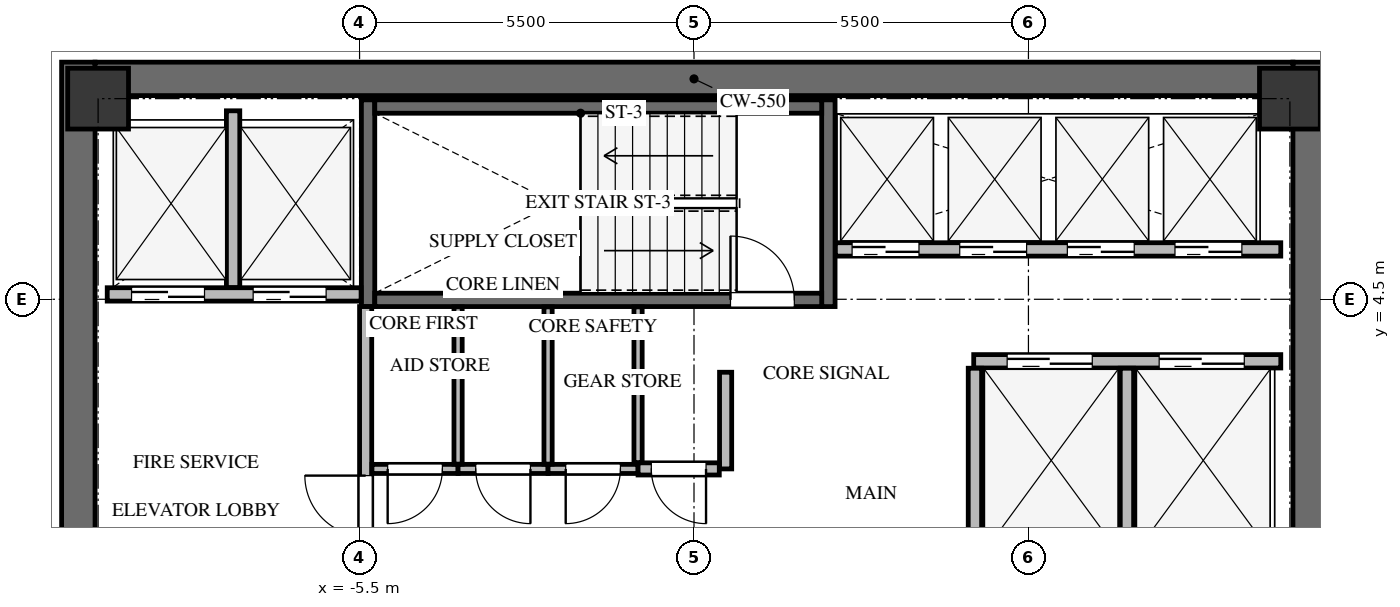
"""IFC4 building model, lengths in metres.
Left out: names, types, materials, properties, quantities, classifications, styles, units other than length and angle.
Written with IfcOpenShell. Run it as: python <this file> out.ifc"""

import sys

from ifc_helpers import new_model, si_unit, direction, frame, frame_2d, origin, origin_2d, place, context, subcontext, project, spatial, rectangle, extrude, source, transform, mapped, element, fill, save


model = new_model("IFC4")
c1 = context("Model", 3, precision=1e-05, world=origin(), true_north=direction((0.0, 1.0)))
c2 = subcontext(c1, "Body", "Model", "MODEL_VIEW")
j1 = project(units=[si_unit("LENGTHUNIT", "METRE"), si_unit("PLANEANGLEUNIT", "RADIAN")], contexts=[c1])
p1 = place(None, origin())
s1 = spatial("IfcSite", under=j1, at=p1, CompositionType="ELEMENT")
p2 = place(p1, origin())
s2 = spatial("IfcBuilding", under=s1, at=p2, CompositionType="ELEMENT")
p3 = place(p2, frame((0.0, 0.0, 221.6)))
s3 = spatial("IfcBuildingStorey", under=s2, at=p3, CompositionType="ELEMENT", Elevation=221.6)
for number, where, z_axis, x_axis in (
    (1, (-10.125, -8.4, 0.0), (0.0, 0.0, 1.0), (0.0, 1.0, 0.0)),
    (2, (10.125, -8.4, 0.0), (0.0, 0.0, 1.0), (0.0, 1.0, 0.0)),
):
    element("IfcWall", number, at=place(p3, frame(where, z_axis=z_axis, x_axis=x_axis)), inside=s3, PredefinedType="SHEAR", context=c2, shape_type="SweptSolid", body=[
        extrude(rectangle(XDim=16.8, YDim=0.55, at=frame_2d((8.4, 0.0))), origin(), (0.0, 0.0, 1.0), 3.3),
    ])
p4 = place(p3, frame((-9.85, 8.125, 0.0), z_axis=(0.0, 0.0, 1.0), x_axis=(1.0, 0.0, 0.0)))
e3 = element("IfcWall", 3, at=p4, inside=s3, PredefinedType="SHEAR", context=c2, shape_type="SweptSolid", body=[
    extrude(rectangle(XDim=19.7, YDim=0.55, at=frame_2d((9.85, 0.0))), origin(), (0.0, 0.0, 1.0), 3.3),
])
for number, where, z_axis, x_axis in (
    (4, (2.21, 4.38, -0.24), (0.0, 0.0, 1.0), (0.0, 1.0, 0.0)),
    (5, (-5.36, 7.78, -0.24), (0.0, 0.0, 1.0), (0.0, -1.0, 0.0)),
):
    element("IfcWall", number, at=place(p3, frame(where, z_axis=z_axis, x_axis=x_axis)), inside=s3, PredefinedType="SHEAR", context=c2, shape_type="SweptSolid", body=[
        extrude(rectangle(XDim=3.4, YDim=0.22, at=frame_2d((1.7, 0.0))), origin(), (0.0, 0.0, 1.0), 3.3),
    ])
p5 = place(p3, frame((-5.25, 4.49, -0.24), z_axis=(0.0, 0.0, 1.0), x_axis=(1.0, 0.0, 0.0)))
e6 = element("IfcWall", 6, at=p5, inside=s3, PredefinedType="SHEAR", context=c2, shape_type="SweptSolid", body=[
    extrude(rectangle(XDim=7.35, YDim=0.22, at=frame_2d((3.675, 0.0))), origin(), (0.0, 0.0, 1.0), 3.3),
])
p6 = place(p5, frame((5.85, 0.0, 0.0)))
e7 = element("IfcOpeningElement", 7, at=p6, cuts=e6, PredefinedType="OPENING", context=c2, shape_type="SweptSolid", body=[
    extrude(rectangle(XDim=1.05, YDim=2.15, at=frame_2d((0.525, 1.075))), frame((0.0, 0.12, 0.0), z_axis=(0.0, -1.0, 0.0), x_axis=(1.0, 0.0, 0.0)), (0.0, 0.0, 1.0), 0.24),
])
p7 = place(p3, frame((2.1, 7.67, -0.24), z_axis=(0.0, 0.0, 1.0), x_axis=(-1.0, 0.0, 0.0)))
e8 = element("IfcWall", 8, at=p7, inside=s3, PredefinedType="SHEAR", context=c2, shape_type="SweptSolid", body=[
    extrude(rectangle(XDim=7.35, YDim=0.22, at=frame_2d((3.675, 0.0))), origin(), (0.0, 0.0, 1.0), 3.3),
])
m1 = source(origin(), c2, "Body", "SweptSolid", [
    extrude(rectangle(XDim=1.0, YDim=1.0, at=origin_2d()), origin(), (0.0, 0.0, 1.0), 3.3),
])
for number, where, z_axis, x_axis in (
    (9, (9.8, 7.8, -0.24), (0.0, 0.0, 1.0), (1.0, 0.0, 0.0)),
    (10, (-9.8, 7.8, -0.24), (0.0, 0.0, 1.0), (1.0, 0.0, 0.0)),
):
    element("IfcColumn", number, at=place(p3, frame(where, z_axis=z_axis, x_axis=x_axis)), inside=s3, PredefinedType="COLUMN", context=c2, shape_type="MappedRepresentation", body=[
        mapped(m1, transform((0.0, 0.0, 0.0), x_axis=(1.0, 0.0, 0.0), y_axis=(0.0, 1.0, 0.0), z_axis=(0.0, 0.0, 1.0), scale=1.0)),
    ])
p8 = place(p3, frame((-9.65, 4.58, 0.0), z_axis=(0.0, 0.0, 1.0), x_axis=(1.0, 0.0, 0.0)))
e11 = element("IfcWall", 11, at=p8, inside=s3, PredefinedType="SOLIDWALL", context=c2, shape_type="SweptSolid", body=[
    extrude(rectangle(XDim=4.175, YDim=0.22, at=frame_2d((2.087, 0.0))), origin(), (0.0, 0.0, 1.0), 3.045),
])
p9 = place(p8, frame((0.4, 0.0, 0.0)))
e12 = element("IfcOpeningElement", 12, at=p9, cuts=e11, PredefinedType="OPENING", context=c2, shape_type="SweptSolid", body=[
    extrude(rectangle(XDim=1.2, YDim=2.15, at=frame_2d((0.6, 1.075))), frame((0.0, 0.12, 0.0), z_axis=(0.0, -1.0, 0.0), x_axis=(1.0, 0.0, 0.0)), (0.0, 0.0, 1.0), 0.24),
])
p10 = place(p8, frame((2.4, 0.0, 0.0)))
e13 = element("IfcOpeningElement", 13, at=p10, cuts=e11, PredefinedType="OPENING", context=c2, shape_type="SweptSolid", body=[
    extrude(rectangle(XDim=1.2, YDim=2.15, at=frame_2d((0.6, 1.075))), frame((0.0, 0.12, 0.0), z_axis=(0.0, -1.0, 0.0), x_axis=(1.0, 0.0, 0.0)), (0.0, 0.0, 1.0), 0.24),
])
p11 = place(p3, frame((-7.58, 4.694, 0.0), z_axis=(0.0, 0.0, 1.0), x_axis=(0.0, 1.0, 0.0)))
e14 = element("IfcWall", 14, at=p11, inside=s3, PredefinedType="SOLIDWALL", context=c2, shape_type="SweptSolid", body=[
    extrude(rectangle(XDim=2.906, YDim=0.22, at=frame_2d((1.453, 0.0))), origin(), (0.0, 0.0, 1.0), 3.045),
])
p12 = place(p3, frame((-5.4, 0.354, 0.0), z_axis=(0.0, 0.0, 1.0), x_axis=(0.0, 1.0, 0.0)))
e15 = element("IfcWall", 15, at=p12, inside=s3, PredefinedType="SOLIDWALL", context=c2, shape_type="SweptSolid", body=[
    extrude(rectangle(XDim=4.026, YDim=0.2, at=frame_2d((2.013, 0.0))), origin(), (0.0, 0.0, 1.0), 3.045),
])
p13 = place(p12, frame((0.246, 0.0, 0.0)))
e16 = element("IfcOpeningElement", 16, at=p13, cuts=e15, PredefinedType="OPENING", context=c2, shape_type="SweptSolid", body=[
    extrude(rectangle(XDim=1.0, YDim=2.15, at=frame_2d((0.5, 1.075))), frame((0.0, 0.11, 0.0), z_axis=(0.0, -1.0, 0.0), x_axis=(1.0, 0.0, 0.0)), (0.0, 0.0, 1.0), 0.22),
])
p14 = place(p3, frame((4.6, 3.48, 0.0), z_axis=(0.0, 0.0, 1.0), x_axis=(1.0, 0.0, 0.0)))
e17 = element("IfcWall", 17, at=p14, inside=s3, PredefinedType="SOLIDWALL", context=c2, shape_type="SweptSolid", body=[
    extrude(rectangle(XDim=5.05, YDim=0.22, at=frame_2d((2.525, 0.0))), origin(), (0.0, 0.0, 1.0), 3.045),
])
p15 = place(p14, frame((0.55, 0.0, 0.0)))
e18 = element("IfcOpeningElement", 18, at=p15, cuts=e17, PredefinedType="OPENING", context=c2, shape_type="SweptSolid", body=[
    extrude(rectangle(XDim=1.4, YDim=2.15, at=frame_2d((0.7, 1.075))), frame((0.0, 0.12, 0.0), z_axis=(0.0, -1.0, 0.0), x_axis=(1.0, 0.0, 0.0)), (0.0, 0.0, 1.0), 0.24),
])
p16 = place(p14, frame((3.05, 0.0, 0.0)))
e19 = element("IfcOpeningElement", 19, at=p16, cuts=e17, PredefinedType="OPENING", context=c2, shape_type="SweptSolid", body=[
    extrude(rectangle(XDim=1.4, YDim=2.15, at=frame_2d((0.7, 1.075))), frame((0.0, 0.12, 0.0), z_axis=(0.0, -1.0, 0.0), x_axis=(1.0, 0.0, 0.0)), (0.0, 0.0, 1.0), 0.24),
])
for number, where, z_axis, x_axis in (
    (20, (4.62, 0.18, 0.0), (0.0, 0.0, 1.0), (0.0, 1.0, 0.0)),
    (21, (7.12, 0.18, 0.0), (0.0, 0.0, 1.0), (0.0, 1.0, 0.0)),
):
    element("IfcWall", number, at=place(p3, frame(where, z_axis=z_axis, x_axis=x_axis)), inside=s3, PredefinedType="SOLIDWALL", context=c2, shape_type="SweptSolid", body=[
        extrude(rectangle(XDim=3.186, YDim=0.22, at=frame_2d((1.593, 0.0))), origin(), (0.0, 0.0, 1.0), 3.045),
    ])
p17 = place(p3, frame((2.325, 5.32, 0.0), z_axis=(0.0, 0.0, 1.0), x_axis=(1.0, 0.0, 0.0)))
e22 = element("IfcWall", 22, at=p17, inside=s3, PredefinedType="SOLIDWALL", context=c2, shape_type="SweptSolid", body=[
    extrude(rectangle(XDim=7.325, YDim=0.22, at=frame_2d((3.663, 0.0))), origin(), (0.0, 0.0, 1.0), 3.045),
])
p18 = place(p17, frame((0.275, 0.0, 0.0)))
e23 = element("IfcOpeningElement", 23, at=p18, cuts=e22, PredefinedType="OPENING", context=c2, shape_type="SweptSolid", body=[
    extrude(rectangle(XDim=1.1, YDim=2.15, at=frame_2d((0.55, 1.075))), frame((0.0, 0.12, 0.0), z_axis=(0.0, -1.0, 0.0), x_axis=(1.0, 0.0, 0.0)), (0.0, 0.0, 1.0), 0.24),
])
p19 = place(p17, frame((2.045, 0.0, 0.0)))
e24 = element("IfcOpeningElement", 24, at=p19, cuts=e22, PredefinedType="OPENING", context=c2, shape_type="SweptSolid", body=[
    extrude(rectangle(XDim=1.1, YDim=2.15, at=frame_2d((0.55, 1.075))), frame((0.0, 0.12, 0.0), z_axis=(0.0, -1.0, 0.0), x_axis=(1.0, 0.0, 0.0)), (0.0, 0.0, 1.0), 0.24),
])
p20 = place(p17, frame((3.815, 0.0, 0.0)))
e25 = element("IfcOpeningElement", 25, at=p20, cuts=e22, PredefinedType="OPENING", context=c2, shape_type="SweptSolid", body=[
    extrude(rectangle(XDim=1.1, YDim=2.15, at=frame_2d((0.55, 1.075))), frame((0.0, 0.12, 0.0), z_axis=(0.0, -1.0, 0.0), x_axis=(1.0, 0.0, 0.0)), (0.0, 0.0, 1.0), 0.24),
])
p21 = place(p17, frame((5.585, 0.0, 0.0)))
e26 = element("IfcOpeningElement", 26, at=p21, cuts=e22, PredefinedType="OPENING", context=c2, shape_type="SweptSolid", body=[
    extrude(rectangle(XDim=1.1, YDim=2.15, at=frame_2d((0.55, 1.075))), frame((0.0, 0.12, 0.0), z_axis=(0.0, -1.0, 0.0), x_axis=(1.0, 0.0, 0.0)), (0.0, 0.0, 1.0), 0.24),
])
p22 = place(p3, frame((-3.88, 1.71, 0.0), z_axis=(0.0, 0.0, 1.0), x_axis=(-1.0, 0.0, 0.0)))
e27 = element("IfcWall", 27, at=p22, inside=s3, PredefinedType="PARTITIONING", context=c2, shape_type="SweptSolid", body=[
    extrude(rectangle(XDim=1.416, YDim=0.15, at=frame_2d((0.708, 0.0))), origin(), (0.0, 0.0, 1.0), 3.045),
])
p23 = place(p22, frame((0.258, 0.0, 0.0)))
e28 = element("IfcOpeningElement", 28, at=p23, cuts=e27, PredefinedType="OPENING", context=c2, shape_type="SweptSolid", body=[
    extrude(rectangle(XDim=0.9, YDim=2.05, at=frame_2d((0.45, 1.025))), frame((0.0, 0.085, 0.0), z_axis=(0.0, -1.0, 0.0), x_axis=(1.0, 0.0, 0.0)), (0.0, 0.0, 1.0), 0.17),
])
p24 = place(p3, frame((-2.4, 1.71, 0.0), z_axis=(0.0, 0.0, 1.0), x_axis=(-1.0, 0.0, 0.0)))
e29 = element("IfcWall", 29, at=p24, inside=s3, PredefinedType="PARTITIONING", context=c2, shape_type="SweptSolid", body=[
    extrude(rectangle(XDim=1.48, YDim=0.15, at=frame_2d((0.74, 0.0))), origin(), (0.0, 0.0, 1.0), 3.045),
])
p25 = place(p24, frame((0.29, 0.0, 0.0)))
e30 = element("IfcOpeningElement", 30, at=p25, cuts=e29, PredefinedType="OPENING", context=c2, shape_type="SweptSolid", body=[
    extrude(rectangle(XDim=0.9, YDim=2.05, at=frame_2d((0.45, 1.025))), frame((0.0, 0.085, 0.0), z_axis=(0.0, -1.0, 0.0), x_axis=(1.0, 0.0, 0.0)), (0.0, 0.0, 1.0), 0.17),
])
p26 = place(p3, frame((-0.92, 1.71, 0.0), z_axis=(0.0, 0.0, 1.0), x_axis=(-1.0, 0.0, 0.0)))
e31 = element("IfcWall", 31, at=p26, inside=s3, PredefinedType="PARTITIONING", context=c2, shape_type="SweptSolid", body=[
    extrude(rectangle(XDim=1.48, YDim=0.15, at=frame_2d((0.74, 0.0))), origin(), (0.0, 0.0, 1.0), 3.045),
])
p27 = place(p26, frame((0.29, 0.0, 0.0)))
e32 = element("IfcOpeningElement", 32, at=p27, cuts=e31, PredefinedType="OPENING", context=c2, shape_type="SweptSolid", body=[
    extrude(rectangle(XDim=0.9, YDim=2.05, at=frame_2d((0.45, 1.025))), frame((0.0, 0.085, 0.0), z_axis=(0.0, -1.0, 0.0), x_axis=(1.0, 0.0, 0.0)), (0.0, 0.0, 1.0), 0.17),
])
p28 = place(p3, frame((0.52, 3.3, 0.0), z_axis=(0.0, 0.0, 1.0), x_axis=(0.0, -1.0, 0.0)))
e33 = element("IfcWall", 33, at=p28, inside=s3, PredefinedType="SOLIDWALL", context=c2, shape_type="SweptSolid", body=[
    extrude(rectangle(XDim=1.59, YDim=0.2, at=frame_2d((0.795, 0.0))), origin(), (0.0, 0.0, 1.0), 3.045),
])
p29 = place(p3, frame((0.416, 1.71, 0.0), z_axis=(0.0, 0.0, 1.0), x_axis=(-1.0, 0.0, 0.0)))
e34 = element("IfcWall", 34, at=p29, inside=s3, PredefinedType="SOLIDWALL", context=c2, shape_type="SweptSolid", body=[
    extrude(rectangle(XDim=1.336, YDim=0.2, at=frame_2d((0.668, 0.0))), origin(), (0.0, 0.0, 1.0), 3.045),
])
p30 = place(p29, frame((0.218, 0.0, 0.0)))
e35 = element("IfcOpeningElement", 35, at=p30, cuts=e34, PredefinedType="OPENING", context=c2, shape_type="SweptSolid", body=[
    extrude(rectangle(XDim=0.9, YDim=2.05, at=frame_2d((0.45, 1.025))), frame((0.0, 0.11, 0.0), z_axis=(0.0, -1.0, 0.0), x_axis=(1.0, 0.0, 0.0)), (0.0, 0.0, 1.0), 0.22),
])
for number, where, z_axis, x_axis in (
    (36, (-3.88, 4.375, 0.0), (0.0, 0.0, 1.0), (0.0, -1.0, 0.0)),
    (37, (-2.4, 4.375, 0.0), (0.0, 0.0, 1.0), (0.0, -1.0, 0.0)),
):
    element("IfcWall", number, at=place(p3, frame(where, z_axis=z_axis, x_axis=x_axis)), inside=s3, PredefinedType="PARTITIONING", context=c2, shape_type="SweptSolid", body=[
        extrude(rectangle(XDim=2.586, YDim=0.135, at=frame_2d((1.293, 0.0))), origin(), (0.0, 0.0, 1.0), 3.045),
    ])
p31 = place(p3, frame((-0.92, 4.375, 0.0), z_axis=(0.0, 0.0, 1.0), x_axis=(0.0, -1.0, 0.0)))
e38 = element("IfcWall", 38, at=p31, inside=s3, PredefinedType="PARTITIONING", context=c2, shape_type="SweptSolid", body=[
    extrude(rectangle(XDim=2.561, YDim=0.135, at=frame_2d((1.281, 0.0))), origin(), (0.0, 0.0, 1.0), 3.045),
])
m2 = source(origin(), c2, "Body", "SweptSolid", [
    extrude(rectangle(XDim=1.05, YDim=2.15, at=frame_2d((0.525, 1.075))), frame((0.0, 0.025, 0.0), z_axis=(0.0, -1.0, 0.0), x_axis=(1.0, 0.0, 0.0)), (0.0, 0.0, 1.0), 0.05),
])
p32 = place(p6, origin())
e39 = element("IfcDoor", 39, at=p32, inside=s3, OperationType="SINGLE_SWING_LEFT", PredefinedType="DOOR", context=c2, shape_type="MappedRepresentation", body=[
    mapped(m2, transform((0.0, 0.0, 0.0), x_axis=(1.0, 0.0, 0.0), y_axis=(0.0, 1.0, 0.0), z_axis=(0.0, 0.0, 1.0), scale=1.0)),
])
fill(e7, e39)
m3 = source(origin(), c2, "Body", "SweptSolid", [
    extrude(rectangle(XDim=1.2, YDim=2.15, at=frame_2d((0.6, 1.075))), frame((0.0, 0.025, 0.0), z_axis=(0.0, -1.0, 0.0), x_axis=(1.0, 0.0, 0.0)), (0.0, 0.0, 1.0), 0.05),
])
p33 = place(p9, origin())
e40 = element("IfcDoor", 40, at=p33, inside=s3, OperationType="DOUBLE_DOOR_SLIDING", PredefinedType="DOOR", context=c2, shape_type="MappedRepresentation", body=[
    mapped(m3, transform((0.0, 0.0, 0.0), x_axis=(1.0, 0.0, 0.0), y_axis=(0.0, 1.0, 0.0), z_axis=(0.0, 0.0, 1.0), scale=1.0)),
])
fill(e12, e40)
p34 = place(p10, origin())
e41 = element("IfcDoor", 41, at=p34, inside=s3, OperationType="DOUBLE_DOOR_SLIDING", PredefinedType="DOOR", context=c2, shape_type="MappedRepresentation", body=[
    mapped(m3, transform((0.0, 0.0, 0.0), x_axis=(1.0, 0.0, 0.0), y_axis=(0.0, 1.0, 0.0), z_axis=(0.0, 0.0, 1.0), scale=1.0)),
])
fill(e13, e41)
m4 = source(origin(), c2, "Body", "SweptSolid", [
    extrude(rectangle(XDim=1.0, YDim=2.15, at=frame_2d((0.5, 1.075))), frame((0.0, 0.025, 0.0), z_axis=(0.0, -1.0, 0.0), x_axis=(1.0, 0.0, 0.0)), (0.0, 0.0, 1.0), 0.05),
])
p35 = place(p13, origin())
e42 = element("IfcDoor", 42, at=p35, inside=s3, OperationType="SINGLE_SWING_RIGHT", PredefinedType="DOOR", context=c2, shape_type="MappedRepresentation", body=[
    mapped(m4, transform((0.0, 0.0, 0.0), x_axis=(1.0, 0.0, 0.0), y_axis=(0.0, 1.0, 0.0), z_axis=(0.0, 0.0, 1.0), scale=1.0)),
])
fill(e16, e42)
m5 = source(origin(), c2, "Body", "SweptSolid", [
    extrude(rectangle(XDim=1.4, YDim=2.15, at=frame_2d((0.7, 1.075))), frame((0.0, 0.025, 0.0), z_axis=(0.0, -1.0, 0.0), x_axis=(1.0, 0.0, 0.0)), (0.0, 0.0, 1.0), 0.05),
])
p36 = place(p15, origin())
e43 = element("IfcDoor", 43, at=p36, inside=s3, OperationType="DOUBLE_DOOR_SLIDING", PredefinedType="DOOR", context=c2, shape_type="MappedRepresentation", body=[
    mapped(m5, transform((0.0, 0.0, 0.0), x_axis=(1.0, 0.0, 0.0), y_axis=(0.0, 1.0, 0.0), z_axis=(0.0, 0.0, 1.0), scale=1.0)),
])
fill(e18, e43)
p37 = place(p16, origin())
e44 = element("IfcDoor", 44, at=p37, inside=s3, OperationType="DOUBLE_DOOR_SLIDING", PredefinedType="DOOR", context=c2, shape_type="MappedRepresentation", body=[
    mapped(m5, transform((0.0, 0.0, 0.0), x_axis=(1.0, 0.0, 0.0), y_axis=(0.0, 1.0, 0.0), z_axis=(0.0, 0.0, 1.0), scale=1.0)),
])
fill(e19, e44)
m6 = source(origin(), c2, "Body", "SweptSolid", [
    extrude(rectangle(XDim=1.1, YDim=2.15, at=frame_2d((0.55, 1.075))), frame((0.0, 0.025, 0.0), z_axis=(0.0, -1.0, 0.0), x_axis=(1.0, 0.0, 0.0)), (0.0, 0.0, 1.0), 0.05),
])
p38 = place(p18, origin())
e45 = element("IfcDoor", 45, at=p38, inside=s3, OperationType="DOUBLE_DOOR_SLIDING", PredefinedType="DOOR", context=c2, shape_type="MappedRepresentation", body=[
    mapped(m6, transform((0.0, 0.0, 0.0), x_axis=(1.0, 0.0, 0.0), y_axis=(0.0, 1.0, 0.0), z_axis=(0.0, 0.0, 1.0), scale=1.0)),
])
fill(e23, e45)
p39 = place(p19, origin())
e46 = element("IfcDoor", 46, at=p39, inside=s3, OperationType="DOUBLE_DOOR_SLIDING", PredefinedType="DOOR", context=c2, shape_type="MappedRepresentation", body=[
    mapped(m6, transform((0.0, 0.0, 0.0), x_axis=(1.0, 0.0, 0.0), y_axis=(0.0, 1.0, 0.0), z_axis=(0.0, 0.0, 1.0), scale=1.0)),
])
fill(e24, e46)
p40 = place(p20, origin())
e47 = element("IfcDoor", 47, at=p40, inside=s3, OperationType="DOUBLE_DOOR_SLIDING", PredefinedType="DOOR", context=c2, shape_type="MappedRepresentation", body=[
    mapped(m6, transform((0.0, 0.0, 0.0), x_axis=(1.0, 0.0, 0.0), y_axis=(0.0, 1.0, 0.0), z_axis=(0.0, 0.0, 1.0), scale=1.0)),
])
fill(e25, e47)
p41 = place(p21, origin())
e48 = element("IfcDoor", 48, at=p41, inside=s3, OperationType="DOUBLE_DOOR_SLIDING", PredefinedType="DOOR", context=c2, shape_type="MappedRepresentation", body=[
    mapped(m6, transform((0.0, 0.0, 0.0), x_axis=(1.0, 0.0, 0.0), y_axis=(0.0, 1.0, 0.0), z_axis=(0.0, 0.0, 1.0), scale=1.0)),
])
fill(e26, e48)
m7 = source(origin(), c2, "Body", "SweptSolid", [
    extrude(rectangle(XDim=0.9, YDim=2.05, at=frame_2d((0.45, 1.025))), frame((0.0, 0.025, 0.0), z_axis=(0.0, -1.0, 0.0), x_axis=(1.0, 0.0, 0.0)), (0.0, 0.0, 1.0), 0.05),
])
p42 = place(p23, origin())
e49 = element("IfcDoor", 49, at=p42, inside=s3, OperationType="SINGLE_SWING_RIGHT", PredefinedType="DOOR", context=c2, shape_type="MappedRepresentation", body=[
    mapped(m7, transform((0.0, 0.0, 0.0), x_axis=(1.0, 0.0, 0.0), y_axis=(0.0, 1.0, 0.0), z_axis=(0.0, 0.0, 1.0), scale=1.0)),
])
fill(e28, e49)
m8 = source(origin(), c2, "Body", "SweptSolid", [
    extrude(rectangle(XDim=0.9, YDim=2.05, at=frame_2d((0.45, 1.025))), frame((0.0, 0.025, 0.0), z_axis=(0.0, -1.0, 0.0), x_axis=(1.0, 0.0, 0.0)), (0.0, 0.0, 1.0), 0.05),
])
p43 = place(p25, origin())
e50 = element("IfcDoor", 50, at=p43, inside=s3, OperationType="SINGLE_SWING_LEFT", PredefinedType="DOOR", context=c2, shape_type="MappedRepresentation", body=[
    mapped(m8, transform((0.0, 0.0, 0.0), x_axis=(1.0, 0.0, 0.0), y_axis=(0.0, 1.0, 0.0), z_axis=(0.0, 0.0, 1.0), scale=1.0)),
])
fill(e30, e50)
p44 = place(p27, origin())
e51 = element("IfcDoor", 51, at=p44, inside=s3, OperationType="SINGLE_SWING_RIGHT", PredefinedType="DOOR", context=c2, shape_type="MappedRepresentation", body=[
    mapped(m7, transform((0.0, 0.0, 0.0), x_axis=(1.0, 0.0, 0.0), y_axis=(0.0, 1.0, 0.0), z_axis=(0.0, 0.0, 1.0), scale=1.0)),
])
fill(e32, e51)
p45 = place(p30, origin())
e52 = element("IfcDoor", 52, at=p45, inside=s3, OperationType="SINGLE_SWING_LEFT", PredefinedType="DOOR", context=c2, shape_type="MappedRepresentation", body=[
    mapped(m8, transform((0.0, 0.0, 0.0), x_axis=(1.0, 0.0, 0.0), y_axis=(0.0, 1.0, 0.0), z_axis=(0.0, 0.0, 1.0), scale=1.0)),
])
fill(e35, e52)
save(model, sys.argv[1])
